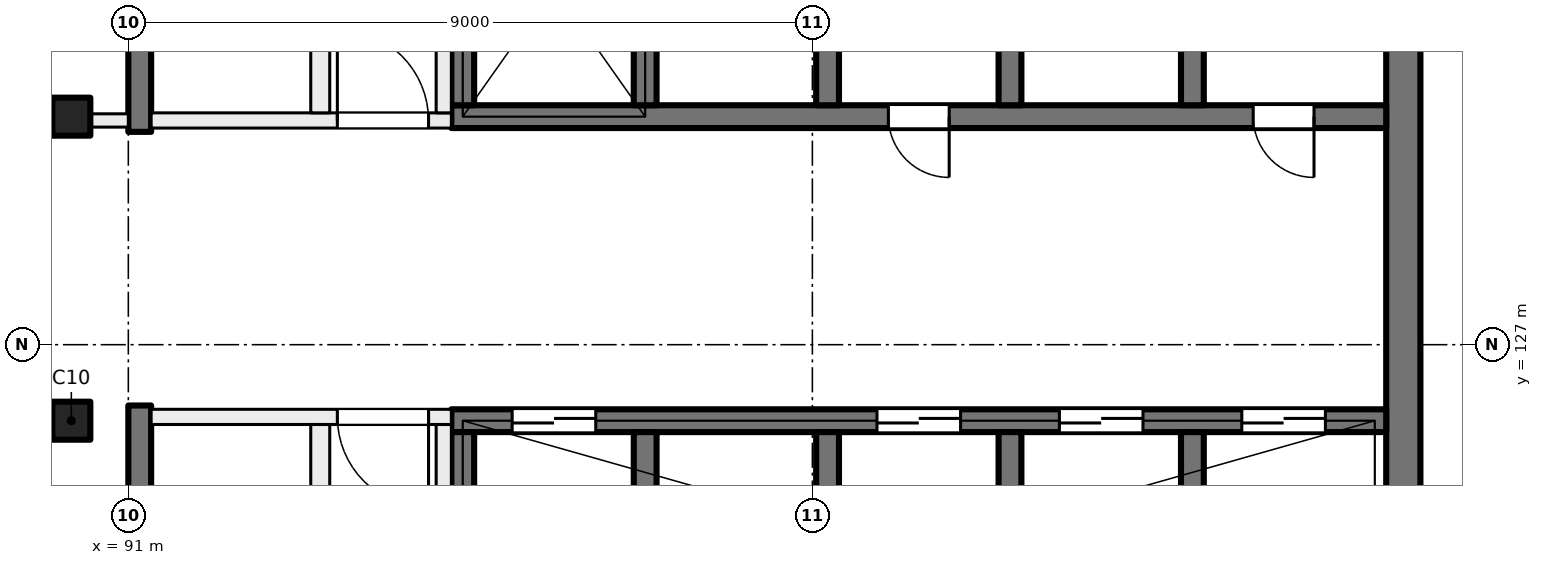
"""IFC4 building model, lengths in metres.
Left out: names, types, materials, properties, quantities, classifications, styles, units other than length and angle.
Written with IfcOpenShell. Run it as: python <this file> out.ifc"""

import sys

from ifc_helpers import new_model, si_unit, direction, frame, frame_2d, origin, origin_2d, place, context, subcontext, project, spatial, rectangle, extrude, element, fill, save


model = new_model("IFC4")
c1 = context("Model", 3, precision=1e-05, world=origin(), true_north=direction((0.0, 1.0)))
c2 = subcontext(c1, "Body", "Model", "MODEL_VIEW")
j1 = project(units=[si_unit("LENGTHUNIT", "METRE"), si_unit("PLANEANGLEUNIT", "RADIAN")], contexts=[c1])
p1 = place(None, origin())
s1 = spatial("IfcSite", under=j1, at=p1, CompositionType="ELEMENT")
p2 = place(p1, origin())
s2 = spatial("IfcBuilding", under=s1, at=p2, CompositionType="ELEMENT")
p3 = place(p2, frame((0.0, 0.0, 273.5)))
s3 = spatial("IfcBuildingStorey", under=s2, at=p3, CompositionType="ELEMENT", Elevation=273.5)
for number, where, z_axis, x_axis in (
    (1, (90.25, 130.0, 0.0), (0.0, 0.0, 1.0), (1.0, 0.0, 0.0)),
    (2, (90.25, 126.0, 0.0), (0.0, 0.0, 1.0), (1.0, 0.0, 0.0)),
):
    element("IfcColumn", number, at=place(p3, frame(where, z_axis=z_axis, x_axis=x_axis)), inside=s3, PredefinedType="COLUMN", context=c2, shape_type="SweptSolid", body=[
        extrude(rectangle(XDim=0.5, YDim=0.5, at=origin_2d()), origin(), (0.0, 0.0, 1.0), 4.0),
    ])
p4 = place(p3, frame((107.775, 135.2, 0.0), z_axis=(0.0, 0.0, 1.0), x_axis=(0.0, -1.0, 0.0)))
e3 = element("IfcWall", 3, at=p4, inside=s3, PredefinedType="SHEAR", context=c2, shape_type="SweptSolid", body=[
    extrude(rectangle(XDim=14.4, YDim=0.45, at=frame_2d((7.2, 0.0))), origin(), (0.0, 0.0, 1.0), 4.0),
])
p5 = place(p3, frame((107.55, 130.0, 0.0), z_axis=(0.0, 0.0, 1.0), x_axis=(-1.0, 0.0, 0.0)))
e4 = element("IfcWall", 4, at=p5, inside=s3, PredefinedType="SHEAR", context=c2, shape_type="SweptSolid", body=[
    extrude(rectangle(XDim=12.3, YDim=0.3, at=frame_2d((6.15, 0.0))), origin(), (0.0, 0.0, 1.0), 4.0),
])
p6 = place(p5, frame((0.95, 0.0, 0.0)))
e5 = element("IfcOpeningElement", 5, at=p6, cuts=e4, PredefinedType="OPENING", context=c2, shape_type="SweptSolid", body=[
    extrude(rectangle(XDim=0.8, YDim=2.1, at=frame_2d((0.4, 1.05))), frame((0.0, 0.16, 0.0), z_axis=(0.0, -1.0, 0.0), x_axis=(1.0, 0.0, 0.0)), (0.0, 0.0, 1.0), 0.32),
])
p7 = place(p5, frame((5.75, 0.0, 0.0)))
e6 = element("IfcOpeningElement", 6, at=p7, cuts=e4, PredefinedType="OPENING", context=c2, shape_type="SweptSolid", body=[
    extrude(rectangle(XDim=0.8, YDim=2.1, at=frame_2d((0.4, 1.05))), frame((0.0, 0.16, 0.0), z_axis=(0.0, -1.0, 0.0), x_axis=(1.0, 0.0, 0.0)), (0.0, 0.0, 1.0), 0.32),
])
for number, where, z_axis, x_axis in (
    (7, (105.0, 133.25, 0.0), (0.0, 0.0, 1.0), (0.0, -1.0, 0.0)),
    (8, (102.6, 133.25, 0.0), (0.0, 0.0, 1.0), (0.0, -1.0, 0.0)),
    (9, (100.2, 133.25, 0.0), (0.0, 0.0, 1.0), (0.0, -1.0, 0.0)),
    (10, (97.8, 133.25, 0.0), (0.0, 0.0, 1.0), (0.0, -1.0, 0.0)),
    (11, (95.4, 133.25, 0.0), (0.0, 0.0, 1.0), (0.0, -1.0, 0.0)),
):
    element("IfcWall", number, at=place(p3, frame(where, z_axis=z_axis, x_axis=x_axis)), inside=s3, PredefinedType="SHEAR", context=c2, shape_type="SweptSolid", body=[
        extrude(rectangle(XDim=3.1, YDim=0.3, at=frame_2d((1.55, 0.0))), origin(), (0.0, 0.0, 1.0), 4.0),
    ])
p8 = place(p3, frame((107.55, 126.0, 0.0), z_axis=(0.0, 0.0, 1.0), x_axis=(-1.0, 0.0, 0.0)))
e12 = element("IfcWall", 12, at=p8, inside=s3, PredefinedType="SHEAR", context=c2, shape_type="SweptSolid", body=[
    extrude(rectangle(XDim=12.3, YDim=0.3, at=frame_2d((6.15, 0.0))), origin(), (0.0, 0.0, 1.0), 4.0),
])
p9 = place(p8, frame((0.8, 0.0, 0.0)))
e13 = element("IfcOpeningElement", 13, at=p9, cuts=e12, PredefinedType="OPENING", context=c2, shape_type="SweptSolid", body=[
    extrude(rectangle(XDim=1.1, YDim=2.1, at=frame_2d((0.55, 1.05))), frame((0.0, 0.16, 0.0), z_axis=(0.0, -1.0, 0.0), x_axis=(1.0, 0.0, 0.0)), (0.0, 0.0, 1.0), 0.32),
])
p10 = place(p8, frame((3.2, 0.0, 0.0)))
e14 = element("IfcOpeningElement", 14, at=p10, cuts=e12, PredefinedType="OPENING", context=c2, shape_type="SweptSolid", body=[
    extrude(rectangle(XDim=1.1, YDim=2.1, at=frame_2d((0.55, 1.05))), frame((0.0, 0.16, 0.0), z_axis=(0.0, -1.0, 0.0), x_axis=(1.0, 0.0, 0.0)), (0.0, 0.0, 1.0), 0.32),
])
p11 = place(p8, frame((5.6, 0.0, 0.0)))
e15 = element("IfcOpeningElement", 15, at=p11, cuts=e12, PredefinedType="OPENING", context=c2, shape_type="SweptSolid", body=[
    extrude(rectangle(XDim=1.1, YDim=2.1, at=frame_2d((0.55, 1.05))), frame((0.0, 0.16, 0.0), z_axis=(0.0, -1.0, 0.0), x_axis=(1.0, 0.0, 0.0)), (0.0, 0.0, 1.0), 0.32),
])
p12 = place(p8, frame((10.4, 0.0, 0.0)))
e16 = element("IfcOpeningElement", 16, at=p12, cuts=e12, PredefinedType="OPENING", context=c2, shape_type="SweptSolid", body=[
    extrude(rectangle(XDim=1.1, YDim=2.1, at=frame_2d((0.55, 1.05))), frame((0.0, 0.16, 0.0), z_axis=(0.0, -1.0, 0.0), x_axis=(1.0, 0.0, 0.0)), (0.0, 0.0, 1.0), 0.32),
])
for number, where, z_axis, x_axis in (
    (17, (105.0, 125.85, 0.0), (0.0, 0.0, 1.0), (0.0, -1.0, 0.0)),
    (18, (102.6, 125.85, 0.0), (0.0, 0.0, 1.0), (0.0, -1.0, 0.0)),
    (19, (100.2, 125.85, 0.0), (0.0, 0.0, 1.0), (0.0, -1.0, 0.0)),
    (20, (97.8, 125.85, 0.0), (0.0, 0.0, 1.0), (0.0, -1.0, 0.0)),
    (21, (95.4, 125.85, 0.0), (0.0, 0.0, 1.0), (0.0, -1.0, 0.0)),
):
    element("IfcWall", number, at=place(p3, frame(where, z_axis=z_axis, x_axis=x_axis)), inside=s3, PredefinedType="SHEAR", context=c2, shape_type="SweptSolid", body=[
        extrude(rectangle(XDim=3.1, YDim=0.3, at=frame_2d((1.55, 0.0))), origin(), (0.0, 0.0, 1.0), 4.0),
    ])
for number, where, z_axis, x_axis in (
    (22, (91.15, 138.55, 0.0), (0.0, 0.0, 1.0), (0.0, -1.0, 0.0)),
    (23, (91.15, 126.2, 0.0), (0.0, 0.0, 1.0), (0.0, -1.0, 0.0)),
):
    element("IfcWall", number, at=place(p3, frame(where, z_axis=z_axis, x_axis=x_axis)), inside=s3, PredefinedType="SHEAR", context=c2, shape_type="SweptSolid", body=[
        extrude(rectangle(XDim=8.75, YDim=0.3, at=frame_2d((4.375, 0.0))), origin(), (0.0, 0.0, 1.0), 4.0),
    ])
p13 = place(p3, frame((95.25, 126.05, 0.0), z_axis=(0.0, 0.0, 1.0), x_axis=(-1.0, 0.0, 0.0)))
e24 = element("IfcWall", 24, at=p13, inside=s3, PredefinedType="PARTITIONING", context=c2, shape_type="SweptSolid", body=[
    extrude(rectangle(XDim=3.95, YDim=0.2, at=frame_2d((1.975, 0.0))), origin(), (0.0, 0.0, 1.0), 3.625),
])
p14 = place(p13, frame((0.3, 0.0, 0.0)))
e25 = element("IfcOpeningElement", 25, at=p14, cuts=e24, PredefinedType="OPENING", context=c2, shape_type="SweptSolid", body=[
    extrude(rectangle(XDim=1.2, YDim=2.1, at=frame_2d((0.6, 1.05))), frame((0.0, 0.11, 0.0), z_axis=(0.0, -1.0, 0.0), x_axis=(1.0, 0.0, 0.0)), (0.0, 0.0, 1.0), 0.22),
])
p15 = place(p3, frame((95.15, 117.45, 0.0), z_axis=(0.0, 0.0, 1.0), x_axis=(0.0, 1.0, 0.0)))
e26 = element("IfcWall", 26, at=p15, inside=s3, PredefinedType="PARTITIONING", context=c2, shape_type="SweptSolid", body=[
    extrude(rectangle(XDim=8.5, YDim=0.2, at=frame_2d((4.25, 0.0))), origin(), (0.0, 0.0, 1.0), 3.625),
])
p16 = place(p15, frame((1.75, 0.0, 0.0)))
e27 = element("IfcOpeningElement", 27, at=p16, cuts=e26, PredefinedType="OPENING", context=c2, shape_type="SweptSolid", body=[
    extrude(rectangle(XDim=1.5, YDim=2.1, at=frame_2d((0.75, 1.05))), frame((0.0, 0.11, 0.0), z_axis=(0.0, -1.0, 0.0), x_axis=(1.0, 0.0, 0.0)), (0.0, 0.0, 1.0), 0.22),
])
p17 = place(p3, frame((93.525, 117.45, 0.0), z_axis=(0.0, 0.0, 1.0), x_axis=(0.0, 1.0, 0.0)))
e28 = element("IfcWall", 28, at=p17, inside=s3, PredefinedType="PARTITIONING", context=c2, shape_type="SweptSolid", body=[
    extrude(rectangle(XDim=8.5, YDim=0.25, at=frame_2d((4.25, 0.0))), origin(), (0.0, 0.0, 1.0), 3.625),
])
p18 = place(p17, frame((3.85, 0.0, 0.0)))
e29 = element("IfcOpeningElement", 29, at=p18, cuts=e28, PredefinedType="OPENING", context=c2, shape_type="SweptSolid", body=[
    extrude(rectangle(XDim=0.8, YDim=2.1, at=frame_2d((0.4, 1.05))), frame((0.0, 0.135, 0.0), z_axis=(0.0, -1.0, 0.0), x_axis=(1.0, 0.0, 0.0)), (0.0, 0.0, 1.0), 0.27),
])
p19 = place(p3, frame((91.3, 129.95, 0.0), z_axis=(0.0, 0.0, 1.0), x_axis=(1.0, 0.0, 0.0)))
e30 = element("IfcWall", 30, at=p19, inside=s3, PredefinedType="PARTITIONING", context=c2, shape_type="SweptSolid", body=[
    extrude(rectangle(XDim=3.95, YDim=0.2, at=frame_2d((1.975, 0.0))), origin(), (0.0, 0.0, 1.0), 3.625),
])
p20 = place(p19, frame((2.45, 0.0, 0.0)))
e31 = element("IfcOpeningElement", 31, at=p20, cuts=e30, PredefinedType="OPENING", context=c2, shape_type="SweptSolid", body=[
    extrude(rectangle(XDim=1.2, YDim=2.1, at=frame_2d((0.6, 1.05))), frame((0.0, 0.11, 0.0), z_axis=(0.0, -1.0, 0.0), x_axis=(1.0, 0.0, 0.0)), (0.0, 0.0, 1.0), 0.22),
])
p21 = place(p3, frame((95.15, 130.05, 0.0), z_axis=(0.0, 0.0, 1.0), x_axis=(0.0, 1.0, 0.0)))
e32 = element("IfcWall", 32, at=p21, inside=s3, PredefinedType="PARTITIONING", context=c2, shape_type="SweptSolid", body=[
    extrude(rectangle(XDim=8.5, YDim=0.2, at=frame_2d((4.25, 0.0))), origin(), (0.0, 0.0, 1.0), 3.625),
])
p22 = place(p21, frame((5.25, 0.0, 0.0)))
e33 = element("IfcOpeningElement", 33, at=p22, cuts=e32, PredefinedType="OPENING", context=c2, shape_type="SweptSolid", body=[
    extrude(rectangle(XDim=1.5, YDim=2.1, at=frame_2d((0.75, 1.05))), frame((0.0, 0.11, 0.0), z_axis=(0.0, -1.0, 0.0), x_axis=(1.0, 0.0, 0.0)), (0.0, 0.0, 1.0), 0.22),
])
p23 = place(p3, frame((93.525, 130.05, 0.0), z_axis=(0.0, 0.0, 1.0), x_axis=(0.0, 1.0, 0.0)))
e34 = element("IfcWall", 34, at=p23, inside=s3, PredefinedType="PARTITIONING", context=c2, shape_type="SweptSolid", body=[
    extrude(rectangle(XDim=8.5, YDim=0.25, at=frame_2d((4.25, 0.0))), origin(), (0.0, 0.0, 1.0), 3.625),
])
p24 = place(p23, frame((3.85, 0.0, 0.0)))
e35 = element("IfcOpeningElement", 35, at=p24, cuts=e34, PredefinedType="OPENING", context=c2, shape_type="SweptSolid", body=[
    extrude(rectangle(XDim=0.8, YDim=2.1, at=frame_2d((0.4, 1.05))), frame((0.0, 0.135, 0.0), z_axis=(0.0, -1.0, 0.0), x_axis=(1.0, 0.0, 0.0)), (0.0, 0.0, 1.0), 0.27),
])
p25 = place(p3, frame((85.838, 129.95, 0.0), z_axis=(0.0, 0.0, 1.0), x_axis=(1.0, 0.0, 0.0)))
e36 = element("IfcWall", 36, at=p25, inside=s3, PredefinedType="PARTITIONING", context=c2, shape_type="SweptSolid", body=[
    extrude(rectangle(XDim=5.162, YDim=0.175, at=frame_2d((2.581, 0.0))), origin(), (0.0, 0.0, 1.0), 3.625),
])
p26 = place(p25, frame((1.971, 0.0, 0.0)))
e37 = element("IfcOpeningElement", 37, at=p26, cuts=e36, PredefinedType="OPENING", context=c2, shape_type="SweptSolid", body=[
    extrude(rectangle(XDim=1.2, YDim=2.1, at=frame_2d((0.6, 1.05))), frame((0.0, 0.097, 0.0), z_axis=(0.0, -1.0, 0.0), x_axis=(1.0, 0.0, 0.0)), (0.0, 0.0, 1.0), 0.195),
])
p27 = place(p9, origin())
e38 = element("IfcDoor", 38, at=p27, inside=s3, OperationType="DOUBLE_DOOR_SLIDING", PredefinedType="DOOR", context=c2, shape_type="SweptSolid", body=[
    extrude(rectangle(XDim=1.1, YDim=2.1, at=frame_2d((0.55, 1.05))), frame((0.0, 0.025, 0.0), z_axis=(0.0, -1.0, 0.0), x_axis=(1.0, 0.0, 0.0)), (0.0, 0.0, 1.0), 0.05),
])
fill(e13, e38)
p28 = place(p10, origin())
e39 = element("IfcDoor", 39, at=p28, inside=s3, OperationType="DOUBLE_DOOR_SLIDING", PredefinedType="DOOR", context=c2, shape_type="SweptSolid", body=[
    extrude(rectangle(XDim=1.1, YDim=2.1, at=frame_2d((0.55, 1.05))), frame((0.0, 0.025, 0.0), z_axis=(0.0, -1.0, 0.0), x_axis=(1.0, 0.0, 0.0)), (0.0, 0.0, 1.0), 0.05),
])
fill(e14, e39)
p29 = place(p11, origin())
e40 = element("IfcDoor", 40, at=p29, inside=s3, OperationType="DOUBLE_DOOR_SLIDING", PredefinedType="DOOR", context=c2, shape_type="SweptSolid", body=[
    extrude(rectangle(XDim=1.1, YDim=2.1, at=frame_2d((0.55, 1.05))), frame((0.0, 0.025, 0.0), z_axis=(0.0, -1.0, 0.0), x_axis=(1.0, 0.0, 0.0)), (0.0, 0.0, 1.0), 0.05),
])
fill(e15, e40)
p30 = place(p12, origin())
e41 = element("IfcDoor", 41, at=p30, inside=s3, OperationType="DOUBLE_DOOR_SLIDING", PredefinedType="DOOR", context=c2, shape_type="SweptSolid", body=[
    extrude(rectangle(XDim=1.1, YDim=2.1, at=frame_2d((0.55, 1.05))), frame((0.0, 0.025, 0.0), z_axis=(0.0, -1.0, 0.0), x_axis=(1.0, 0.0, 0.0)), (0.0, 0.0, 1.0), 0.05),
])
fill(e16, e41)
p31 = place(p6, origin())
e42 = element("IfcDoor", 42, at=p31, inside=s3, OperationType="SINGLE_SWING_LEFT", PredefinedType="DOOR", context=c2, shape_type="SweptSolid", body=[
    extrude(rectangle(XDim=0.8, YDim=2.1, at=frame_2d((0.4, 1.05))), frame((0.0, 0.025, 0.0), z_axis=(0.0, -1.0, 0.0), x_axis=(1.0, 0.0, 0.0)), (0.0, 0.0, 1.0), 0.05),
])
fill(e5, e42)
p32 = place(p7, origin())
e43 = element("IfcDoor", 43, at=p32, inside=s3, OperationType="SINGLE_SWING_RIGHT", PredefinedType="DOOR", context=c2, shape_type="SweptSolid", body=[
    extrude(rectangle(XDim=0.8, YDim=2.1, at=frame_2d((0.4, 1.05))), frame((0.0, 0.025, 0.0), z_axis=(0.0, -1.0, 0.0), x_axis=(1.0, 0.0, 0.0)), (0.0, 0.0, 1.0), 0.05),
])
fill(e6, e43)
p33 = place(p14, origin())
e44 = element("IfcDoor", 44, at=p33, inside=s3, OperationType="DOUBLE_DOOR_SINGLE_SWING", PredefinedType="DOOR", context=c2, shape_type="SweptSolid", body=[
    extrude(rectangle(XDim=1.2, YDim=2.1, at=frame_2d((0.6, 1.05))), frame((0.0, 0.025, 0.0), z_axis=(0.0, -1.0, 0.0), x_axis=(1.0, 0.0, 0.0)), (0.0, 0.0, 1.0), 0.05),
])
fill(e25, e44)
p34 = place(p20, origin())
e45 = element("IfcDoor", 45, at=p34, inside=s3, OperationType="DOUBLE_DOOR_SINGLE_SWING", PredefinedType="DOOR", context=c2, shape_type="SweptSolid", body=[
    extrude(rectangle(XDim=1.2, YDim=2.1, at=frame_2d((0.6, 1.05))), frame((0.0, 0.025, 0.0), z_axis=(0.0, -1.0, 0.0), x_axis=(1.0, 0.0, 0.0)), (0.0, 0.0, 1.0), 0.05),
])
fill(e31, e45)
save(model, sys.argv[1])
